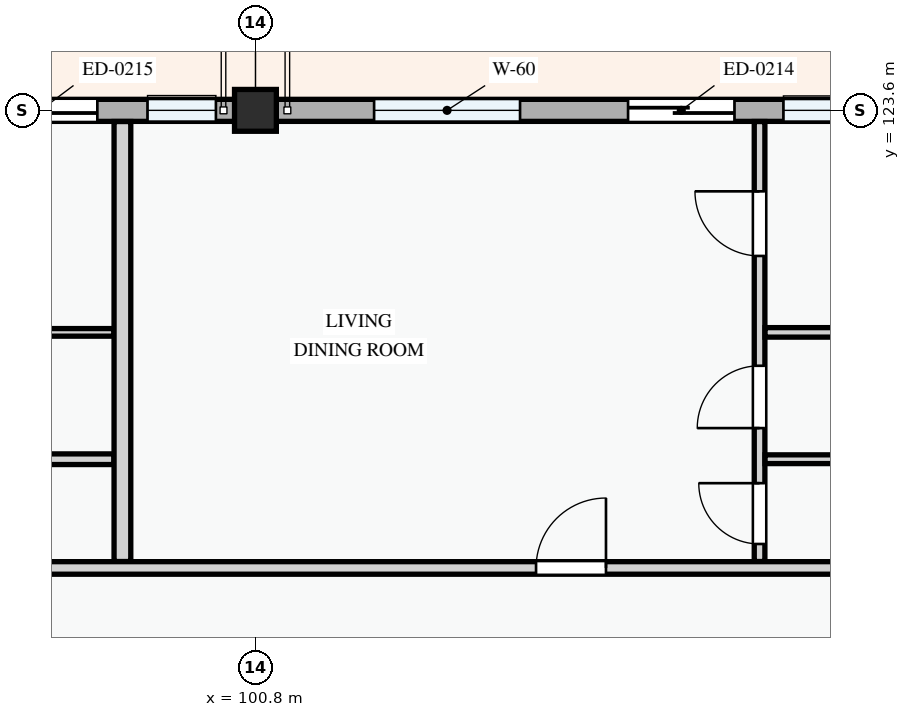
"""IFC4 building model, lengths in metres.
Left out: names, types, materials, properties, quantities, classifications, styles, units other than length and angle.
Written with IfcOpenShell. Run it as: python <this file> out.ifc"""

import sys

from ifc_helpers import new_model, si_unit, direction, frame, frame_2d, origin, origin_2d, place, context, subcontext, project, spatial, rectangle, extrude, element, fill, save


model = new_model("IFC4")
c1 = context("Model", 3, precision=1e-05, world=origin(), true_north=direction((0.0, 1.0)))
c2 = subcontext(c1, "Body", "Model", "MODEL_VIEW")
j1 = project(units=[si_unit("LENGTHUNIT", "METRE"), si_unit("PLANEANGLEUNIT", "RADIAN")], contexts=[c1])
p1 = place(None, origin())
s1 = spatial("IfcSite", under=j1, at=p1, CompositionType="ELEMENT")
p2 = place(p1, origin())
s2 = spatial("IfcBuilding", under=s1, at=p2, CompositionType="ELEMENT")
p3 = place(p2, frame((0.0, 0.0, 24.6)))
s3 = spatial("IfcBuildingStorey", under=s2, at=p3, CompositionType="ELEMENT", Elevation=24.6)
p4 = place(p3, frame((100.8, 123.6, 0.0), z_axis=(0.0, 0.0, 1.0), x_axis=(1.0, 0.0, 0.0)))
e1 = element("IfcColumn", 1, at=p4, inside=s3, PredefinedType="COLUMN", context=c2, shape_type="SweptSolid", body=[
    extrude(rectangle(XDim=0.55, YDim=0.55, at=origin_2d()), origin(), (0.0, 0.0, 1.0), 3.3),
])
p5 = place(p3, frame((109.2, 123.6, 0.0), z_axis=(0.0, 0.0, 1.0), x_axis=(-1.0, 0.0, 0.0)))
e2 = element("IfcWall", 2, at=p5, inside=s3, PredefinedType="STANDARD", context=c2, shape_type="SweptSolid", body=[
    extrude(rectangle(XDim=8.4, YDim=0.29, at=frame_2d((4.2, 0.0))), origin(), (0.0, 0.0, 1.0), 2.375),
])
p6 = place(p5, frame((2.098, 0.0, 0.0)))
e3 = element("IfcOpeningElement", 3, at=p6, cuts=e2, PredefinedType="OPENING", context=c2, shape_type="SweptSolid", body=[
    extrude(rectangle(XDim=1.4, YDim=2.2, at=frame_2d((0.7, 1.1))), frame((0.0, 0.155, 0.0), z_axis=(0.0, -1.0, 0.0), x_axis=(1.0, 0.0, 0.0)), (0.0, 0.0, 1.0), 0.31),
])
p7 = place(p5, frame((0.504, 0.0, 0.78)))
e4 = element("IfcOpeningElement", 4, at=p7, cuts=e2, PredefinedType="OPENING", context=c2, shape_type="SweptSolid", body=[
    extrude(rectangle(XDim=0.95, YDim=1.15, at=frame_2d((0.475, 0.575))), frame((0.0, 0.155, 0.0), z_axis=(0.0, -1.0, 0.0), x_axis=(1.0, 0.0, 0.0)), (0.0, 0.0, 1.0), 0.31),
])
p8 = place(p5, frame((4.919, 0.0, 0.78)))
e5 = element("IfcOpeningElement", 5, at=p8, cuts=e2, PredefinedType="OPENING", context=c2, shape_type="SweptSolid", body=[
    extrude(rectangle(XDim=1.92, YDim=1.44, at=frame_2d((0.96, 0.72))), frame((0.0, 0.155, 0.0), z_axis=(0.0, -1.0, 0.0), x_axis=(1.0, 0.0, 0.0)), (0.0, 0.0, 1.0), 0.31),
])
p9 = place(p3, frame((100.8, 123.6, 0.0), z_axis=(0.0, 0.0, 1.0), x_axis=(-1.0, 0.0, 0.0)))
e6 = element("IfcWall", 6, at=p9, inside=s3, PredefinedType="STANDARD", context=c2, shape_type="SweptSolid", body=[
    extrude(rectangle(XDim=6.0, YDim=0.29, at=frame_2d((3.0, 0.0))), origin(), (0.0, 0.0, 1.0), 2.475),
])
p10 = place(p9, frame((2.08, 0.0, 0.0)))
e7 = element("IfcOpeningElement", 7, at=p10, cuts=e6, PredefinedType="OPENING", context=c2, shape_type="SweptSolid", body=[
    extrude(rectangle(XDim=1.5, YDim=2.2, at=frame_2d((0.75, 1.1))), frame((0.0, 0.155, 0.0), z_axis=(0.0, -1.0, 0.0), x_axis=(1.0, 0.0, 0.0)), (0.0, 0.0, 1.0), 0.31),
])
p11 = place(p9, frame((0.52, 0.0, 0.78)))
e8 = element("IfcOpeningElement", 8, at=p11, cuts=e6, PredefinedType="OPENING", context=c2, shape_type="SweptSolid", body=[
    extrude(rectangle(XDim=0.9, YDim=1.2, at=frame_2d((0.45, 0.6))), frame((0.0, 0.155, 0.0), z_axis=(0.0, -1.0, 0.0), x_axis=(1.0, 0.0, 0.0)), (0.0, 0.0, 1.0), 0.31),
])
p12 = place(p9, frame((3.945, 0.0, 0.78)))
e9 = element("IfcOpeningElement", 9, at=p12, cuts=e6, PredefinedType="OPENING", context=c2, shape_type="SweptSolid", body=[
    extrude(rectangle(XDim=1.55, YDim=1.4, at=frame_2d((0.775, 0.7))), frame((0.0, 0.155, 0.0), z_axis=(0.0, -1.0, 0.0), x_axis=(1.0, 0.0, 0.0)), (0.0, 0.0, 1.0), 0.31),
])
p13 = place(p3, frame((89.443, 120.679, 0.0), z_axis=(0.0, 0.0, 1.0), x_axis=(1.0, 0.0, 0.0)))
e10 = element("IfcWall", 10, at=p13, inside=s3, PredefinedType="PARTITIONING", context=c2, shape_type="SweptSolid", body=[
    extrude(rectangle(XDim=9.495, YDim=0.1, at=frame_2d((4.748, 0.0))), origin(), (0.0, 0.0, 1.0), 3.0),
])
p14 = place(p3, frame((89.443, 119.01, 0.0), z_axis=(0.0, 0.0, 1.0), x_axis=(1.0, 0.0, 0.0)))
e11 = element("IfcWall", 11, at=p14, inside=s3, PredefinedType="PARTITIONING", context=c2, shape_type="SweptSolid", body=[
    extrude(rectangle(XDim=9.495, YDim=0.14, at=frame_2d((4.748, 0.0))), origin(), (0.0, 0.0, 1.0), 3.0),
])
p15 = place(p3, frame((107.432, 117.665, 0.0), z_axis=(0.0, 0.0, 1.0), x_axis=(0.0, 1.0, 0.0)))
e12 = element("IfcWall", 12, at=p15, inside=s3, PredefinedType="PARTITIONING", context=c2, shape_type="SweptSolid", body=[
    extrude(rectangle(XDim=5.788, YDim=0.14, at=frame_2d((2.894, 0.0))), origin(), (0.0, 0.0, 1.0), 3.0),
])
p16 = place(p15, frame((0.231, 0.0, 0.0)))
e13 = element("IfcOpeningElement", 13, at=p16, cuts=e12, PredefinedType="OPENING", context=c2, shape_type="SweptSolid", body=[
    extrude(rectangle(XDim=0.8, YDim=2.1, at=frame_2d((0.4, 1.05))), frame((0.0, 0.08, 0.0), z_axis=(0.0, -1.0, 0.0), x_axis=(1.0, 0.0, 0.0)), (0.0, 0.0, 1.0), 0.16),
])
p17 = place(p15, frame((1.755, 0.0, 0.0)))
e14 = element("IfcOpeningElement", 14, at=p17, cuts=e12, PredefinedType="OPENING", context=c2, shape_type="SweptSolid", body=[
    extrude(rectangle(XDim=0.82, YDim=2.08, at=frame_2d((0.41, 1.04))), frame((0.0, 0.08, 0.0), z_axis=(0.0, -1.0, 0.0), x_axis=(1.0, 0.0, 0.0)), (0.0, 0.0, 1.0), 0.16),
])
p18 = place(p15, frame((4.02, 0.0, 0.0)))
e15 = element("IfcOpeningElement", 15, at=p18, cuts=e12, PredefinedType="OPENING", context=c2, shape_type="SweptSolid", body=[
    extrude(rectangle(XDim=0.85, YDim=2.1, at=frame_2d((0.425, 1.05))), frame((0.0, 0.08, 0.0), z_axis=(0.0, -1.0, 0.0), x_axis=(1.0, 0.0, 0.0)), (0.0, 0.0, 1.0), 0.16),
])
p19 = place(p3, frame((107.504, 120.679, 0.0), z_axis=(0.0, 0.0, 1.0), x_axis=(1.0, 0.0, 0.0)))
e16 = element("IfcWall", 16, at=p19, inside=s3, PredefinedType="PARTITIONING", context=c2, shape_type="SweptSolid", body=[
    extrude(rectangle(XDim=11.823, YDim=0.125, at=frame_2d((5.912, 0.0))), origin(), (0.0, 0.0, 1.0), 3.0),
])
p20 = place(p3, frame((107.504, 119.01, 0.0), z_axis=(0.0, 0.0, 1.0), x_axis=(1.0, 0.0, 0.0)))
e17 = element("IfcWall", 17, at=p20, inside=s3, PredefinedType="PARTITIONING", context=c2, shape_type="SweptSolid", body=[
    extrude(rectangle(XDim=11.823, YDim=0.115, at=frame_2d((5.912, 0.0))), origin(), (0.0, 0.0, 1.0), 3.0),
])
p21 = place(p3, frame((99.05, 117.665, 0.0), z_axis=(0.0, 0.0, 1.0), x_axis=(0.0, 1.0, 0.0)))
e18 = element("IfcWall", 18, at=p21, inside=s3, PredefinedType="PARTITIONING", context=c2, shape_type="SweptSolid", body=[
    extrude(rectangle(XDim=5.788, YDim=0.22, at=frame_2d((2.894, 0.0))), origin(), (0.0, 0.0, 1.0), 3.0),
])
p22 = place(p3, frame((80.547, 117.58, 0.0), z_axis=(0.0, 0.0, 1.0), x_axis=(1.0, 0.0, 0.0)))
e19 = element("IfcWall", 19, at=p22, inside=s3, PredefinedType="PARTITIONING", context=c2, shape_type="SweptSolid", body=[
    extrude(rectangle(XDim=71.993, YDim=0.165, at=frame_2d((35.997, 0.0))), origin(), (0.0, 0.0, 1.0), 3.0),
])
p23 = place(p22, frame((2.262, 0.0, 0.0)))
e20 = element("IfcOpeningElement", 20, at=p23, cuts=e19, PredefinedType="OPENING", context=c2, shape_type="SweptSolid", body=[
    extrude(rectangle(XDim=0.92, YDim=2.1, at=frame_2d((0.46, 1.05))), frame((0.0, 0.093, 0.0), z_axis=(0.0, -1.0, 0.0), x_axis=(1.0, 0.0, 0.0)), (0.0, 0.0, 1.0), 0.185),
])
p24 = place(p22, frame((23.945, 0.0, 0.0)))
e21 = element("IfcOpeningElement", 21, at=p24, cuts=e19, PredefinedType="OPENING", context=c2, shape_type="SweptSolid", body=[
    extrude(rectangle(XDim=0.92, YDim=2.1, at=frame_2d((0.46, 1.05))), frame((0.0, 0.093, 0.0), z_axis=(0.0, -1.0, 0.0), x_axis=(1.0, 0.0, 0.0)), (0.0, 0.0, 1.0), 0.185),
])
p25 = place(p22, frame((39.133, 0.0, 0.0)))
e22 = element("IfcOpeningElement", 22, at=p25, cuts=e19, PredefinedType="OPENING", context=c2, shape_type="SweptSolid", body=[
    extrude(rectangle(XDim=0.92, YDim=2.1, at=frame_2d((0.46, 1.05))), frame((0.0, 0.093, 0.0), z_axis=(0.0, -1.0, 0.0), x_axis=(1.0, 0.0, 0.0)), (0.0, 0.0, 1.0), 0.185),
])
p26 = place(p22, frame((59.929, 0.0, 0.0)))
e23 = element("IfcOpeningElement", 23, at=p26, cuts=e19, PredefinedType="OPENING", context=c2, shape_type="SweptSolid", body=[
    extrude(rectangle(XDim=0.92, YDim=2.1, at=frame_2d((0.46, 1.05))), frame((0.0, 0.093, 0.0), z_axis=(0.0, -1.0, 0.0), x_axis=(1.0, 0.0, 0.0)), (0.0, 0.0, 1.0), 0.185),
])
p27 = place(p6, frame((1.4, 0.0, 0.0), z_axis=(0.0, 0.0, 1.0), x_axis=(-1.0, 0.0, 0.0)))
e24 = element("IfcDoor", 24, at=p27, inside=s3, OperationType="SLIDING_TO_LEFT", PredefinedType="DOOR", context=c2, shape_type="SweptSolid", body=[
    extrude(rectangle(XDim=1.4, YDim=2.2, at=frame_2d((0.7, 1.1))), frame((0.0, 0.025, 0.0), z_axis=(0.0, -1.0, 0.0), x_axis=(1.0, 0.0, 0.0)), (0.0, 0.0, 1.0), 0.05),
])
fill(e3, e24)
p28 = place(p7, origin())
e25 = element("IfcWindow", 25, at=p28, inside=s3, PartitioningType="SINGLE_PANEL", PredefinedType="WINDOW", context=c2, shape_type="SweptSolid", body=[
    extrude(rectangle(XDim=0.95, YDim=1.15, at=frame_2d((0.475, 0.575))), frame((0.0, 0.03, 0.0), z_axis=(0.0, -1.0, 0.0), x_axis=(1.0, 0.0, 0.0)), (0.0, 0.0, 1.0), 0.06),
])
fill(e4, e25)
p29 = place(p8, origin())
e26 = element("IfcWindow", 26, at=p29, inside=s3, PartitioningType="DOUBLE_PANEL_VERTICAL", PredefinedType="WINDOW", context=c2, shape_type="SweptSolid", body=[
    extrude(rectangle(XDim=1.92, YDim=1.44, at=frame_2d((0.96, 0.72))), frame((0.0, 0.03, 0.0), z_axis=(0.0, -1.0, 0.0), x_axis=(1.0, 0.0, 0.0)), (0.0, 0.0, 1.0), 0.06),
])
fill(e5, e26)
p30 = place(p10, frame((1.5, 0.0, 0.0), z_axis=(0.0, 0.0, 1.0), x_axis=(-1.0, 0.0, 0.0)))
e27 = element("IfcDoor", 27, at=p30, inside=s3, OperationType="SLIDING_TO_RIGHT", PredefinedType="DOOR", context=c2, shape_type="SweptSolid", body=[
    extrude(rectangle(XDim=1.5, YDim=2.2, at=frame_2d((0.75, 1.1))), frame((0.0, 0.025, 0.0), z_axis=(0.0, -1.0, 0.0), x_axis=(1.0, 0.0, 0.0)), (0.0, 0.0, 1.0), 0.05),
])
fill(e7, e27)
p31 = place(p11, origin())
e28 = element("IfcWindow", 28, at=p31, inside=s3, PartitioningType="SINGLE_PANEL", PredefinedType="WINDOW", context=c2, shape_type="SweptSolid", body=[
    extrude(rectangle(XDim=0.9, YDim=1.2, at=frame_2d((0.45, 0.6))), frame((0.0, 0.03, 0.0), z_axis=(0.0, -1.0, 0.0), x_axis=(1.0, 0.0, 0.0)), (0.0, 0.0, 1.0), 0.06),
])
fill(e8, e28)
p32 = place(p16, origin())
e29 = element("IfcDoor", 29, at=p32, inside=s3, OperationType="SINGLE_SWING_RIGHT", PredefinedType="DOOR", context=c2, shape_type="SweptSolid", body=[
    extrude(rectangle(XDim=0.8, YDim=2.1, at=frame_2d((0.4, 1.05))), frame((0.0, 0.025, 0.0), z_axis=(0.0, -1.0, 0.0), x_axis=(1.0, 0.0, 0.0)), (0.0, 0.0, 1.0), 0.05),
])
fill(e13, e29)
p33 = place(p17, origin())
e30 = element("IfcDoor", 30, at=p33, inside=s3, OperationType="SINGLE_SWING_LEFT", PredefinedType="DOOR", context=c2, shape_type="SweptSolid", body=[
    extrude(rectangle(XDim=0.82, YDim=2.08, at=frame_2d((0.41, 1.04))), frame((0.0, 0.025, 0.0), z_axis=(0.0, -1.0, 0.0), x_axis=(1.0, 0.0, 0.0)), (0.0, 0.0, 1.0), 0.05),
])
fill(e14, e30)
p34 = place(p18, origin())
e31 = element("IfcDoor", 31, at=p34, inside=s3, OperationType="SINGLE_SWING_RIGHT", PredefinedType="DOOR", context=c2, shape_type="SweptSolid", body=[
    extrude(rectangle(XDim=0.85, YDim=2.1, at=frame_2d((0.425, 1.05))), frame((0.0, 0.025, 0.0), z_axis=(0.0, -1.0, 0.0), x_axis=(1.0, 0.0, 0.0)), (0.0, 0.0, 1.0), 0.05),
])
fill(e15, e31)
p35 = place(p24, origin())
e32 = element("IfcDoor", 32, at=p35, inside=s3, OperationType="SINGLE_SWING_RIGHT", PredefinedType="DOOR", context=c2, shape_type="SweptSolid", body=[
    extrude(rectangle(XDim=0.92, YDim=2.1, at=frame_2d((0.46, 1.05))), frame((0.0, 0.025, 0.0), z_axis=(0.0, -1.0, 0.0), x_axis=(1.0, 0.0, 0.0)), (0.0, 0.0, 1.0), 0.05),
])
fill(e21, e32)
save(model, sys.argv[1])
